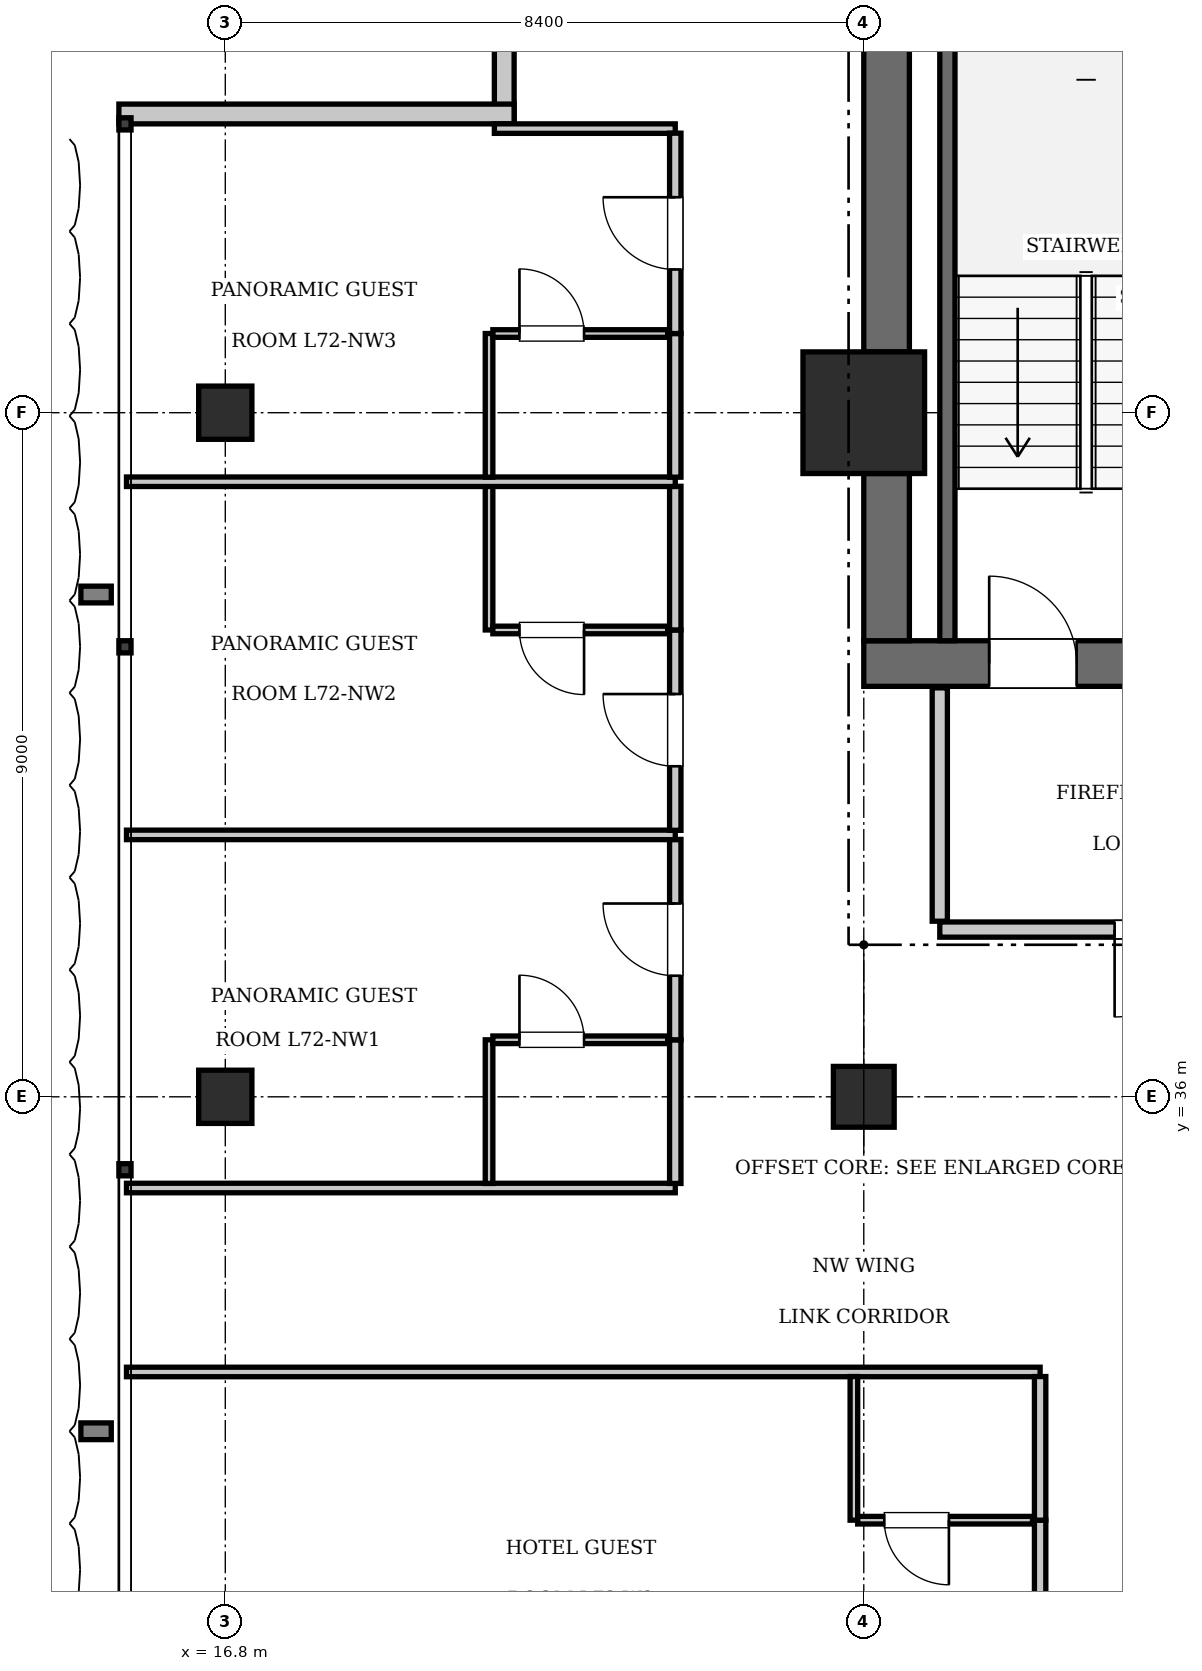
"""IFC4 building model, lengths in metres.
Left out: names, types, materials, properties, quantities, classifications, styles, units other than length and angle.
Written with IfcOpenShell. Run it as: python <this file> out.ifc"""

import sys

from ifc_helpers import new_model, si_unit, direction, frame, frame_2d, origin, origin_2d, place, context, subcontext, project, spatial, rectangle, extrude, element, fill, save


model = new_model("IFC4")
c1 = context("Model", 3, precision=1e-05, world=origin(), true_north=direction((0.0, 1.0)))
c2 = subcontext(c1, "Body", "Model", "MODEL_VIEW")
j1 = project(units=[si_unit("LENGTHUNIT", "METRE"), si_unit("PLANEANGLEUNIT", "RADIAN")], contexts=[c1])
p1 = place(None, origin())
s1 = spatial("IfcSite", under=j1, at=p1, CompositionType="ELEMENT")
p2 = place(p1, origin())
s2 = spatial("IfcBuilding", under=s1, at=p2, CompositionType="ELEMENT")
p3 = place(p2, frame((0.0, 0.0, 293.3)))
s3 = spatial("IfcBuildingStorey", under=s2, at=p3, CompositionType="ELEMENT", Elevation=293.3)
p4 = place(p3, frame((25.2, 45.0, 0.0), z_axis=(0.0, 0.0, 1.0), x_axis=(1.0, 0.0, 0.0)))
e1 = element("IfcColumn", 1, at=p4, inside=s3, PredefinedType="COLUMN", context=c2, shape_type="SweptSolid", body=[
    extrude(rectangle(XDim=1.6, YDim=1.6, at=origin_2d()), origin(), (0.0, 0.0, 1.0), 3.85),
])
p5 = place(p3, frame((25.2, 41.7, 0.0), z_axis=(0.0, 0.0, 1.0), x_axis=(1.0, 0.0, 0.0)))
e2 = element("IfcWall", 2, at=p5, inside=s3, PredefinedType="SHEAR", context=c2, shape_type="SweptSolid", body=[
    extrude(rectangle(XDim=6.8, YDim=0.6, at=frame_2d((3.4, 0.0))), origin(), (0.0, 0.0, 1.0), 3.85),
])
p6 = place(p5, frame((1.65, 0.0, 0.0)))
e3 = element("IfcOpeningElement", 3, at=p6, cuts=e2, PredefinedType="OPENING", context=c2, shape_type="SweptSolid", body=[
    extrude(rectangle(XDim=1.15, YDim=2.15, at=frame_2d((0.575, 1.075))), frame((0.0, 0.31, 0.0), z_axis=(0.0, -1.0, 0.0), x_axis=(1.0, 0.0, 0.0)), (0.0, 0.0, 1.0), 0.62),
])
p7 = place(p5, frame((5.15, 0.0, 0.0)))
e4 = element("IfcOpeningElement", 4, at=p7, cuts=e2, PredefinedType="OPENING", context=c2, shape_type="SweptSolid", body=[
    extrude(rectangle(XDim=1.1, YDim=2.2, at=frame_2d((0.55, 1.1))), frame((0.0, 0.31, 0.0), z_axis=(0.0, -1.0, 0.0), x_axis=(1.0, 0.0, 0.0)), (0.0, 0.0, 1.0), 0.62),
])
p8 = place(p3, frame((25.5, 42.0, 0.0), z_axis=(0.0, 0.0, 1.0), x_axis=(0.0, 1.0, 0.0)))
e5 = element("IfcWall", 5, at=p8, inside=s3, PredefinedType="SHEAR", context=c2, shape_type="SweptSolid", body=[
    extrude(rectangle(XDim=2.2, YDim=0.6, at=frame_2d((1.1, 0.0))), origin(), (0.0, 0.0, 1.0), 3.85),
])
p9 = place(p3, frame((25.5, 45.8, 0.0), z_axis=(0.0, 0.0, 1.0), x_axis=(0.0, 1.0, 0.0)))
e6 = element("IfcWall", 6, at=p9, inside=s3, PredefinedType="SHEAR", context=c2, shape_type="SweptSolid", body=[
    extrude(rectangle(XDim=7.6, YDim=0.6, at=frame_2d((3.8, 0.0))), origin(), (0.0, 0.0, 1.0), 3.85),
])
p10 = place(p3, frame((25.2, 36.0, 0.0), z_axis=(0.0, 0.0, 1.0), x_axis=(1.0, 0.0, 0.0)))
e7 = element("IfcColumn", 7, at=p10, inside=s3, PredefinedType="COLUMN", context=c2, shape_type="SweptSolid", body=[
    extrude(rectangle(XDim=0.8, YDim=0.8, at=origin_2d()), origin(), (0.0, 0.0, 1.0), 3.85),
])
for number, where, z_axis, x_axis in (
    (8, (16.8, 36.0, 0.0), (0.0, 0.0, 1.0), (1.0, 0.0, 0.0)),
    (9, (16.8, 45.0, 0.0), (0.0, 0.0, 1.0), (1.0, 0.0, 0.0)),
):
    element("IfcColumn", number, at=place(p3, frame(where, z_axis=z_axis, x_axis=x_axis)), inside=s3, PredefinedType="COLUMN", context=c2, shape_type="SweptSolid", body=[
        extrude(rectangle(XDim=0.7, YDim=0.7, at=origin_2d()), origin(), (0.0, 0.0, 1.0), 3.85),
    ])
p11 = place(p3, frame((26.3, 42.0, 0.0), z_axis=(0.0, 0.0, 1.0), x_axis=(0.0, 1.0, 0.0)))
e10 = element("IfcWall", 10, at=p11, inside=s3, PredefinedType="SOLIDWALL", context=c2, shape_type="SweptSolid", body=[
    extrude(rectangle(XDim=9.12, YDim=0.2, at=frame_2d((4.56, 0.0))), origin(), (0.0, 0.0, 1.0), 3.61),
])
p12 = place(p3, frame((20.47, 48.8, 0.0), z_axis=(0.0, 0.0, 1.0), x_axis=(0.0, 1.0, 0.0)))
e11 = element("IfcWall", 11, at=p12, inside=s3, PredefinedType="SOLIDWALL", context=c2, shape_type="SweptSolid", body=[
    extrude(rectangle(XDim=5.2, YDim=0.26, at=frame_2d((2.6, 0.0))), origin(), (0.0, 0.0, 1.0), 3.61),
])
p13 = place(p3, frame((15.4, 48.93, 0.0), z_axis=(0.0, 0.0, 1.0), x_axis=(1.0, 0.0, 0.0)))
e12 = element("IfcWall", 12, at=p13, inside=s3, PredefinedType="SOLIDWALL", context=c2, shape_type="SweptSolid", body=[
    extrude(rectangle(XDim=5.2, YDim=0.26, at=frame_2d((2.6, 0.0))), origin(), (0.0, 0.0, 1.0), 3.61),
])
p14 = place(p3, frame((26.2, 38.2, 0.0), z_axis=(0.0, 0.0, 1.0), x_axis=(1.0, 0.0, 0.0)))
e13 = element("IfcWall", 13, at=p14, inside=s3, PredefinedType="PARTITIONING", context=c2, shape_type="SweptSolid", body=[
    extrude(rectangle(XDim=5.8, YDim=0.2, at=frame_2d((2.9, 0.0))), origin(), (0.0, 0.0, 1.0), 3.61),
])
p15 = place(p14, frame((2.3, 0.0, 0.0)))
e14 = element("IfcOpeningElement", 14, at=p15, cuts=e13, PredefinedType="OPENING", context=c2, shape_type="SweptSolid", body=[
    extrude(rectangle(XDim=1.15, YDim=2.15, at=frame_2d((0.575, 1.075))), frame((0.0, 0.11, 0.0), z_axis=(0.0, -1.0, 0.0), x_axis=(1.0, 0.0, 0.0)), (0.0, 0.0, 1.0), 0.22),
])
p16 = place(p3, frame((26.2, 38.31, 0.0), z_axis=(0.0, 0.0, 1.0), x_axis=(0.0, 1.0, 0.0)))
e15 = element("IfcWall", 15, at=p16, inside=s3, PredefinedType="PARTITIONING", context=c2, shape_type="SweptSolid", body=[
    extrude(rectangle(XDim=3.07, YDim=0.2, at=frame_2d((1.535, 0.0))), origin(), (0.0, 0.0, 1.0), 3.61),
])
p17 = place(p3, frame((15.5, 32.38, 0.0), z_axis=(0.0, 0.0, 1.0), x_axis=(1.0, 0.0, 0.0)))
e16 = element("IfcWall", 16, at=p17, inside=s3, PredefinedType="PARTITIONING", context=c2, shape_type="SweptSolid", body=[
    extrude(rectangle(XDim=12.02, YDim=0.125, at=frame_2d((6.01, 0.0))), origin(), (0.0, 0.0, 1.0), 3.61),
])
p18 = place(p3, frame((27.52, 27.4, 0.0), z_axis=(0.0, 0.0, 1.0), x_axis=(0.0, 1.0, 0.0)))
e17 = element("IfcWall", 17, at=p18, inside=s3, PredefinedType="PARTITIONING", context=c2, shape_type="SweptSolid", body=[
    extrude(rectangle(XDim=3.03, YDim=0.15, at=frame_2d((1.515, 0.0))), origin(), (0.0, 0.0, 1.0), 3.61),
])
p19 = place(p18, frame((1.04, 0.0, 0.0)))
e18 = element("IfcOpeningElement", 18, at=p19, cuts=e17, PredefinedType="OPENING", context=c2, shape_type="SweptSolid", body=[
    extrude(rectangle(XDim=0.95, YDim=2.15, at=frame_2d((0.475, 1.075))), frame((0.0, 0.085, 0.0), z_axis=(0.0, -1.0, 0.0), x_axis=(1.0, 0.0, 0.0)), (0.0, 0.0, 1.0), 0.17),
])
p20 = place(p3, frame((27.52, 30.43, 0.0), z_axis=(0.0, 0.0, 1.0), x_axis=(0.0, 1.0, 0.0)))
e19 = element("IfcWall", 19, at=p20, inside=s3, PredefinedType="PARTITIONING", context=c2, shape_type="SweptSolid", body=[
    extrude(rectangle(XDim=1.89, YDim=0.15, at=frame_2d((0.945, 0.0))), origin(), (0.0, 0.0, 1.0), 3.61),
])
p21 = place(p3, frame((25.07, 30.43, 0.0), z_axis=(0.0, 0.0, 1.0), x_axis=(0.0, 1.0, 0.0)))
e20 = element("IfcWall", 20, at=p21, inside=s3, PredefinedType="PARTITIONING", context=c2, shape_type="SweptSolid", body=[
    extrude(rectangle(XDim=1.89, YDim=0.1, at=frame_2d((0.945, 0.0))), origin(), (0.0, 0.0, 1.0), 3.61),
])
p22 = place(p3, frame((25.12, 30.43, 0.0), z_axis=(0.0, 0.0, 1.0), x_axis=(1.0, 0.0, 0.0)))
e21 = element("IfcWall", 21, at=p22, inside=s3, PredefinedType="PARTITIONING", context=c2, shape_type="SweptSolid", body=[
    extrude(rectangle(XDim=2.3, YDim=0.1, at=frame_2d((1.15, 0.0))), origin(), (0.0, 0.0, 1.0), 3.61),
])
p23 = place(p22, frame((0.35, 0.0, 0.0)))
e22 = element("IfcOpeningElement", 22, at=p23, cuts=e21, PredefinedType="OPENING", context=c2, shape_type="SweptSolid", body=[
    extrude(rectangle(XDim=0.85, YDim=2.1, at=frame_2d((0.425, 1.05))), frame((0.0, 0.06, 0.0), z_axis=(0.0, -1.0, 0.0), x_axis=(1.0, 0.0, 0.0)), (0.0, 0.0, 1.0), 0.12),
])
p24 = place(p3, frame((15.5, 34.8, 0.0), z_axis=(0.0, 0.0, 1.0), x_axis=(1.0, 0.0, 0.0)))
e23 = element("IfcWall", 23, at=p24, inside=s3, PredefinedType="PARTITIONING", context=c2, shape_type="SweptSolid", body=[
    extrude(rectangle(XDim=7.22, YDim=0.125, at=frame_2d((3.61, 0.0))), origin(), (0.0, 0.0, 1.0), 3.61),
])
p25 = place(p3, frame((20.34, 48.738, 0.0), z_axis=(0.0, 0.0, 1.0), x_axis=(1.0, 0.0, 0.0)))
e24 = element("IfcWall", 24, at=p25, inside=s3, PredefinedType="PARTITIONING", context=c2, shape_type="SweptSolid", body=[
    extrude(rectangle(XDim=2.38, YDim=0.125, at=frame_2d((1.19, 0.0))), origin(), (0.0, 0.0, 1.0), 3.61),
])
p26 = place(p3, frame((22.72, 34.86, 0.0), z_axis=(0.0, 0.0, 1.0), x_axis=(0.0, 1.0, 0.0)))
e25 = element("IfcWall", 25, at=p26, inside=s3, PredefinedType="PARTITIONING", context=c2, shape_type="SweptSolid", body=[
    extrude(rectangle(XDim=1.89, YDim=0.15, at=frame_2d((0.945, 0.0))), origin(), (0.0, 0.0, 1.0), 3.61),
])
p27 = place(p3, frame((22.72, 36.75, 0.0), z_axis=(0.0, 0.0, 1.0), x_axis=(0.0, 1.0, 0.0)))
e26 = element("IfcWall", 26, at=p27, inside=s3, PredefinedType="PARTITIONING", context=c2, shape_type="SweptSolid", body=[
    extrude(rectangle(XDim=2.636, YDim=0.15, at=frame_2d((1.318, 0.0))), origin(), (0.0, 0.0, 1.0), 3.61),
])
p28 = place(p27, frame((0.843, 0.0, 0.0)))
e27 = element("IfcOpeningElement", 27, at=p28, cuts=e26, PredefinedType="OPENING", context=c2, shape_type="SweptSolid", body=[
    extrude(rectangle(XDim=0.95, YDim=2.15, at=frame_2d((0.475, 1.075))), frame((0.0, 0.085, 0.0), z_axis=(0.0, -1.0, 0.0), x_axis=(1.0, 0.0, 0.0)), (0.0, 0.0, 1.0), 0.17),
])
p29 = place(p3, frame((20.27, 34.86, 0.0), z_axis=(0.0, 0.0, 1.0), x_axis=(0.0, 1.0, 0.0)))
e28 = element("IfcWall", 28, at=p29, inside=s3, PredefinedType="PARTITIONING", context=c2, shape_type="SweptSolid", body=[
    extrude(rectangle(XDim=1.89, YDim=0.1, at=frame_2d((0.945, 0.0))), origin(), (0.0, 0.0, 1.0), 3.61),
])
p30 = place(p3, frame((20.32, 36.75, 0.0), z_axis=(0.0, 0.0, 1.0), x_axis=(1.0, 0.0, 0.0)))
e29 = element("IfcWall", 29, at=p30, inside=s3, PredefinedType="PARTITIONING", context=c2, shape_type="SweptSolid", body=[
    extrude(rectangle(XDim=2.3, YDim=0.1, at=frame_2d((1.15, 0.0))), origin(), (0.0, 0.0, 1.0), 3.61),
])
p31 = place(p30, frame((0.35, 0.0, 0.0)))
e30 = element("IfcOpeningElement", 30, at=p31, cuts=e29, PredefinedType="OPENING", context=c2, shape_type="SweptSolid", body=[
    extrude(rectangle(XDim=0.85, YDim=2.1, at=frame_2d((0.425, 1.05))), frame((0.0, 0.06, 0.0), z_axis=(0.0, -1.0, 0.0), x_axis=(1.0, 0.0, 0.0)), (0.0, 0.0, 1.0), 0.12),
])
p32 = place(p3, frame((15.5, 39.446, 0.0), z_axis=(0.0, 0.0, 1.0), x_axis=(1.0, 0.0, 0.0)))
e31 = element("IfcWall", 31, at=p32, inside=s3, PredefinedType="PARTITIONING", context=c2, shape_type="SweptSolid", body=[
    extrude(rectangle(XDim=7.22, YDim=0.125, at=frame_2d((3.61, 0.0))), origin(), (0.0, 0.0, 1.0), 3.61),
])
p33 = place(p3, frame((22.72, 39.506, 0.0), z_axis=(0.0, 0.0, 1.0), x_axis=(0.0, 1.0, 0.0)))
e32 = element("IfcWall", 32, at=p33, inside=s3, PredefinedType="PARTITIONING", context=c2, shape_type="SweptSolid", body=[
    extrude(rectangle(XDim=2.636, YDim=0.15, at=frame_2d((1.318, 0.0))), origin(), (0.0, 0.0, 1.0), 3.61),
])
p34 = place(p33, frame((0.843, 0.0, 0.0)))
e33 = element("IfcOpeningElement", 33, at=p34, cuts=e32, PredefinedType="OPENING", context=c2, shape_type="SweptSolid", body=[
    extrude(rectangle(XDim=0.95, YDim=2.15, at=frame_2d((0.475, 1.075))), frame((0.0, 0.085, 0.0), z_axis=(0.0, -1.0, 0.0), x_axis=(1.0, 0.0, 0.0)), (0.0, 0.0, 1.0), 0.17),
])
p35 = place(p3, frame((22.72, 42.142, 0.0), z_axis=(0.0, 0.0, 1.0), x_axis=(0.0, 1.0, 0.0)))
e34 = element("IfcWall", 34, at=p35, inside=s3, PredefinedType="PARTITIONING", context=c2, shape_type="SweptSolid", body=[
    extrude(rectangle(XDim=1.89, YDim=0.15, at=frame_2d((0.945, 0.0))), origin(), (0.0, 0.0, 1.0), 3.61),
])
p36 = place(p3, frame((20.27, 42.142, 0.0), z_axis=(0.0, 0.0, 1.0), x_axis=(0.0, 1.0, 0.0)))
e35 = element("IfcWall", 35, at=p36, inside=s3, PredefinedType="PARTITIONING", context=c2, shape_type="SweptSolid", body=[
    extrude(rectangle(XDim=1.89, YDim=0.1, at=frame_2d((0.945, 0.0))), origin(), (0.0, 0.0, 1.0), 3.61),
])
p37 = place(p3, frame((20.32, 42.142, 0.0), z_axis=(0.0, 0.0, 1.0), x_axis=(1.0, 0.0, 0.0)))
e36 = element("IfcWall", 36, at=p37, inside=s3, PredefinedType="PARTITIONING", context=c2, shape_type="SweptSolid", body=[
    extrude(rectangle(XDim=2.3, YDim=0.1, at=frame_2d((1.15, 0.0))), origin(), (0.0, 0.0, 1.0), 3.61),
])
p38 = place(p37, frame((0.35, 0.0, 0.0)))
e37 = element("IfcOpeningElement", 37, at=p38, cuts=e36, PredefinedType="OPENING", context=c2, shape_type="SweptSolid", body=[
    extrude(rectangle(XDim=0.85, YDim=2.1, at=frame_2d((0.425, 1.05))), frame((0.0, 0.06, 0.0), z_axis=(0.0, -1.0, 0.0), x_axis=(1.0, 0.0, 0.0)), (0.0, 0.0, 1.0), 0.12),
])
p39 = place(p3, frame((15.5, 44.092, 0.0), z_axis=(0.0, 0.0, 1.0), x_axis=(1.0, 0.0, 0.0)))
e38 = element("IfcWall", 38, at=p39, inside=s3, PredefinedType="PARTITIONING", context=c2, shape_type="SweptSolid", body=[
    extrude(rectangle(XDim=7.22, YDim=0.125, at=frame_2d((3.61, 0.0))), origin(), (0.0, 0.0, 1.0), 3.61),
])
p40 = place(p3, frame((22.72, 44.152, 0.0), z_axis=(0.0, 0.0, 1.0), x_axis=(0.0, 1.0, 0.0)))
e39 = element("IfcWall", 39, at=p40, inside=s3, PredefinedType="PARTITIONING", context=c2, shape_type="SweptSolid", body=[
    extrude(rectangle(XDim=1.89, YDim=0.15, at=frame_2d((0.945, 0.0))), origin(), (0.0, 0.0, 1.0), 3.61),
])
p41 = place(p3, frame((22.72, 46.042, 0.0), z_axis=(0.0, 0.0, 1.0), x_axis=(0.0, 1.0, 0.0)))
e40 = element("IfcWall", 40, at=p41, inside=s3, PredefinedType="PARTITIONING", context=c2, shape_type="SweptSolid", body=[
    extrude(rectangle(XDim=2.636, YDim=0.15, at=frame_2d((1.318, 0.0))), origin(), (0.0, 0.0, 1.0), 3.61),
])
p42 = place(p41, frame((0.843, 0.0, 0.0)))
e41 = element("IfcOpeningElement", 41, at=p42, cuts=e40, PredefinedType="OPENING", context=c2, shape_type="SweptSolid", body=[
    extrude(rectangle(XDim=0.95, YDim=2.15, at=frame_2d((0.475, 1.075))), frame((0.0, 0.085, 0.0), z_axis=(0.0, -1.0, 0.0), x_axis=(1.0, 0.0, 0.0)), (0.0, 0.0, 1.0), 0.17),
])
p43 = place(p3, frame((20.27, 44.152, 0.0), z_axis=(0.0, 0.0, 1.0), x_axis=(0.0, 1.0, 0.0)))
e42 = element("IfcWall", 42, at=p43, inside=s3, PredefinedType="PARTITIONING", context=c2, shape_type="SweptSolid", body=[
    extrude(rectangle(XDim=1.89, YDim=0.1, at=frame_2d((0.945, 0.0))), origin(), (0.0, 0.0, 1.0), 3.61),
])
p44 = place(p3, frame((20.32, 46.042, 0.0), z_axis=(0.0, 0.0, 1.0), x_axis=(1.0, 0.0, 0.0)))
e43 = element("IfcWall", 43, at=p44, inside=s3, PredefinedType="PARTITIONING", context=c2, shape_type="SweptSolid", body=[
    extrude(rectangle(XDim=2.3, YDim=0.1, at=frame_2d((1.15, 0.0))), origin(), (0.0, 0.0, 1.0), 3.61),
])
p45 = place(p44, frame((0.35, 0.0, 0.0)))
e44 = element("IfcOpeningElement", 44, at=p45, cuts=e43, PredefinedType="OPENING", context=c2, shape_type="SweptSolid", body=[
    extrude(rectangle(XDim=0.85, YDim=2.1, at=frame_2d((0.425, 1.05))), frame((0.0, 0.06, 0.0), z_axis=(0.0, -1.0, 0.0), x_axis=(1.0, 0.0, 0.0)), (0.0, 0.0, 1.0), 0.12),
])
p46 = place(p6, origin())
e45 = element("IfcDoor", 45, at=p46, inside=s3, OperationType="SINGLE_SWING_LEFT", PredefinedType="DOOR", context=c2, shape_type="SweptSolid", body=[
    extrude(rectangle(XDim=1.15, YDim=2.15, at=frame_2d((0.575, 1.075))), frame((0.0, 0.025, 0.0), z_axis=(0.0, -1.0, 0.0), x_axis=(1.0, 0.0, 0.0)), (0.0, 0.0, 1.0), 0.05),
])
fill(e3, e45)
p47 = place(p15, frame((1.15, 0.0, 0.0), z_axis=(0.0, 0.0, 1.0), x_axis=(-1.0, 0.0, 0.0)))
e46 = element("IfcDoor", 46, at=p47, inside=s3, OperationType="SINGLE_SWING_RIGHT", PredefinedType="DOOR", context=c2, shape_type="SweptSolid", body=[
    extrude(rectangle(XDim=1.15, YDim=2.15, at=frame_2d((0.575, 1.075))), frame((0.0, 0.025, 0.0), z_axis=(0.0, -1.0, 0.0), x_axis=(1.0, 0.0, 0.0)), (0.0, 0.0, 1.0), 0.05),
])
fill(e14, e46)
p48 = place(p23, frame((0.85, 0.0, 0.0), z_axis=(0.0, 0.0, 1.0), x_axis=(-1.0, 0.0, 0.0)))
e47 = element("IfcDoor", 47, at=p48, inside=s3, OperationType="SINGLE_SWING_LEFT", PredefinedType="DOOR", context=c2, shape_type="SweptSolid", body=[
    extrude(rectangle(XDim=0.85, YDim=2.1, at=frame_2d((0.425, 1.05))), frame((0.0, 0.025, 0.0), z_axis=(0.0, -1.0, 0.0), x_axis=(1.0, 0.0, 0.0)), (0.0, 0.0, 1.0), 0.05),
])
fill(e22, e47)
p49 = place(p31, origin())
e48 = element("IfcDoor", 48, at=p49, inside=s3, OperationType="SINGLE_SWING_LEFT", PredefinedType="DOOR", context=c2, shape_type="SweptSolid", body=[
    extrude(rectangle(XDim=0.85, YDim=2.1, at=frame_2d((0.425, 1.05))), frame((0.0, 0.025, 0.0), z_axis=(0.0, -1.0, 0.0), x_axis=(1.0, 0.0, 0.0)), (0.0, 0.0, 1.0), 0.05),
])
fill(e30, e48)
p50 = place(p28, origin())
e49 = element("IfcDoor", 49, at=p50, inside=s3, OperationType="SINGLE_SWING_RIGHT", PredefinedType="DOOR", context=c2, shape_type="SweptSolid", body=[
    extrude(rectangle(XDim=0.95, YDim=2.15, at=frame_2d((0.475, 1.075))), frame((0.0, 0.025, 0.0), z_axis=(0.0, -1.0, 0.0), x_axis=(1.0, 0.0, 0.0)), (0.0, 0.0, 1.0), 0.05),
])
fill(e27, e49)
p51 = place(p38, frame((0.85, 0.0, 0.0), z_axis=(0.0, 0.0, 1.0), x_axis=(-1.0, 0.0, 0.0)))
e50 = element("IfcDoor", 50, at=p51, inside=s3, OperationType="SINGLE_SWING_LEFT", PredefinedType="DOOR", context=c2, shape_type="SweptSolid", body=[
    extrude(rectangle(XDim=0.85, YDim=2.1, at=frame_2d((0.425, 1.05))), frame((0.0, 0.025, 0.0), z_axis=(0.0, -1.0, 0.0), x_axis=(1.0, 0.0, 0.0)), (0.0, 0.0, 1.0), 0.05),
])
fill(e37, e50)
p52 = place(p34, origin())
e51 = element("IfcDoor", 51, at=p52, inside=s3, OperationType="SINGLE_SWING_RIGHT", PredefinedType="DOOR", context=c2, shape_type="SweptSolid", body=[
    extrude(rectangle(XDim=0.95, YDim=2.15, at=frame_2d((0.475, 1.075))), frame((0.0, 0.025, 0.0), z_axis=(0.0, -1.0, 0.0), x_axis=(1.0, 0.0, 0.0)), (0.0, 0.0, 1.0), 0.05),
])
fill(e33, e51)
p53 = place(p45, origin())
e52 = element("IfcDoor", 52, at=p53, inside=s3, OperationType="SINGLE_SWING_LEFT", PredefinedType="DOOR", context=c2, shape_type="SweptSolid", body=[
    extrude(rectangle(XDim=0.85, YDim=2.1, at=frame_2d((0.425, 1.05))), frame((0.0, 0.025, 0.0), z_axis=(0.0, -1.0, 0.0), x_axis=(1.0, 0.0, 0.0)), (0.0, 0.0, 1.0), 0.05),
])
fill(e44, e52)
p54 = place(p42, origin())
e53 = element("IfcDoor", 53, at=p54, inside=s3, OperationType="SINGLE_SWING_RIGHT", PredefinedType="DOOR", context=c2, shape_type="SweptSolid", body=[
    extrude(rectangle(XDim=0.95, YDim=2.15, at=frame_2d((0.475, 1.075))), frame((0.0, 0.025, 0.0), z_axis=(0.0, -1.0, 0.0), x_axis=(1.0, 0.0, 0.0)), (0.0, 0.0, 1.0), 0.05),
])
fill(e41, e53)
save(model, sys.argv[1])
